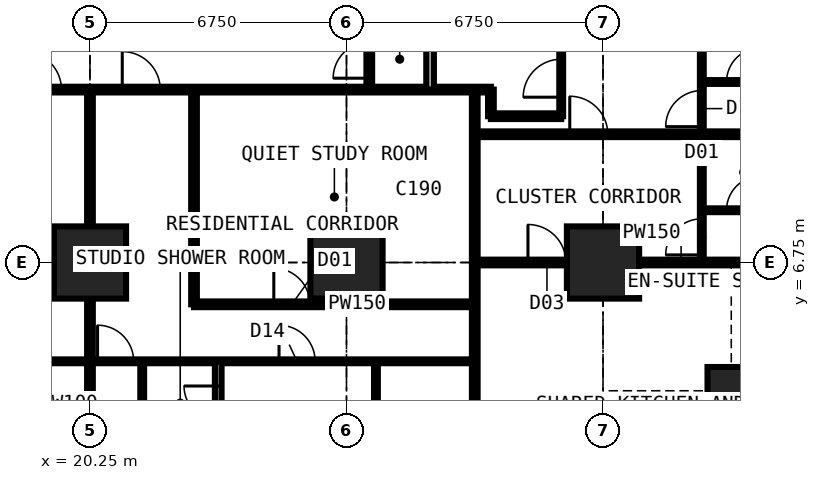
"""IFC4 building model, lengths in metres.
Left out: names, types, materials, properties, quantities, classifications, styles, units other than length and angle.
Written with IfcOpenShell. Run it as: python <this file> out.ifc"""

import sys

from ifc_helpers import new_model, si_unit, direction, frame, frame_2d, origin, origin_2d, place, context, subcontext, project, spatial, rectangle, extrude, element, fill, save


model = new_model("IFC4")
c1 = context("Model", 3, precision=1e-05, world=origin(), true_north=direction((0.0, 1.0)))
c2 = subcontext(c1, "Body", "Model", "MODEL_VIEW")
j1 = project(units=[si_unit("LENGTHUNIT", "METRE"), si_unit("PLANEANGLEUNIT", "RADIAN")], contexts=[c1])
p1 = place(None, origin())
s1 = spatial("IfcSite", under=j1, at=p1, CompositionType="ELEMENT")
p2 = place(p1, origin())
s2 = spatial("IfcBuilding", under=s1, at=p2, CompositionType="ELEMENT")
p3 = place(p2, frame((0.0, 0.0, 32.4)))
s3 = spatial("IfcBuildingStorey", under=s2, at=p3, CompositionType="ELEMENT", Elevation=32.4)
for number, where, z_axis, x_axis in (
    (1, (20.25, 6.75, 0.0), (0.0, 0.0, 1.0), (1.0, 0.0, 0.0)),
    (2, (27.0, 6.75, 0.0), (0.0, 0.0, 1.0), (1.0, 0.0, 0.0)),
    (3, (33.75, 6.75, 0.0), (0.0, 0.0, 1.0), (1.0, 0.0, 0.0)),
):
    element("IfcColumn", number, at=place(p3, frame(where, z_axis=z_axis, x_axis=x_axis)), inside=s3, PredefinedType="COLUMN", context=c2, shape_type="SweptSolid", body=[
        extrude(rectangle(XDim=1.9, YDim=1.9, at=origin_2d()), origin(), (0.0, 0.0, 1.0), 3.6),
    ])
p4 = place(p3, frame((37.125, 3.375, 0.0), z_axis=(0.0, 0.0, 1.0), x_axis=(1.0, 0.0, 0.0)))
e4 = element("IfcColumn", 4, at=p4, inside=s3, PredefinedType="COLUMN", context=c2, shape_type="SweptSolid", body=[
    extrude(rectangle(XDim=1.25, YDim=1.25, at=origin_2d()), origin(), (0.0, 0.0, 1.0), 3.6),
])
p5 = place(p3, frame((6.75, 4.15, 0.0), z_axis=(0.0, 0.0, 1.0), x_axis=(1.0, 0.0, 0.0)))
e5 = element("IfcWall", 5, at=p5, inside=s3, PredefinedType="PARTITIONING", context=c2, shape_type="SweptSolid", body=[
    extrude(rectangle(XDim=23.625, YDim=0.1, at=frame_2d((11.812, 0.0))), origin(), (0.0, 0.0, 1.0), 3.375),
])
p6 = place(p5, frame((2.85, 0.0, 0.0)))
e6 = element("IfcOpeningElement", 6, at=p6, cuts=e5, PredefinedType="OPENING", context=c2, shape_type="SweptSolid", body=[
    extrude(rectangle(XDim=1.0, YDim=2.2, at=frame_2d((0.5, 1.1))), frame((0.0, 0.06, 0.0), z_axis=(0.0, -1.0, 0.0), x_axis=(1.0, 0.0, 0.0)), (0.0, 0.0, 1.0), 0.12),
])
p7 = place(p5, frame((6.95, 0.0, 0.0)))
e7 = element("IfcOpeningElement", 7, at=p7, cuts=e5, PredefinedType="OPENING", context=c2, shape_type="SweptSolid", body=[
    extrude(rectangle(XDim=0.95, YDim=2.2, at=frame_2d((0.475, 1.1))), frame((0.0, 0.06, 0.0), z_axis=(0.0, -1.0, 0.0), x_axis=(1.0, 0.0, 0.0)), (0.0, 0.0, 1.0), 0.12),
])
p8 = place(p5, frame((10.375, 0.0, 0.0)))
e8 = element("IfcOpeningElement", 8, at=p8, cuts=e5, PredefinedType="OPENING", context=c2, shape_type="SweptSolid", body=[
    extrude(rectangle(XDim=0.95, YDim=2.2, at=frame_2d((0.475, 1.1))), frame((0.0, 0.06, 0.0), z_axis=(0.0, -1.0, 0.0), x_axis=(1.0, 0.0, 0.0)), (0.0, 0.0, 1.0), 0.12),
])
p9 = place(p5, frame((18.475, 0.0, 0.0)))
e9 = element("IfcOpeningElement", 9, at=p9, cuts=e5, PredefinedType="OPENING", context=c2, shape_type="SweptSolid", body=[
    extrude(rectangle(XDim=0.95, YDim=2.2, at=frame_2d((0.475, 1.1))), frame((0.0, 0.06, 0.0), z_axis=(0.0, -1.0, 0.0), x_axis=(1.0, 0.0, 0.0)), (0.0, 0.0, 1.0), 0.12),
])
p10 = place(p5, frame((13.7, 0.0, 0.0)))
e10 = element("IfcOpeningElement", 10, at=p10, cuts=e5, PredefinedType="OPENING", context=c2, shape_type="SweptSolid", body=[
    extrude(rectangle(XDim=0.95, YDim=2.2, at=frame_2d((0.475, 1.1))), frame((0.0, 0.06, 0.0), z_axis=(0.0, -1.0, 0.0), x_axis=(1.0, 0.0, 0.0)), (0.0, 0.0, 1.0), 0.12),
])
p11 = place(p3, frame((10.125, 11.3, 0.0), z_axis=(0.0, 0.0, 1.0), x_axis=(1.0, 0.0, 0.0)))
e11 = element("IfcWall", 11, at=p11, inside=s3, PredefinedType="PARTITIONING", context=c2, shape_type="SweptSolid", body=[
    extrude(rectangle(XDim=20.675, YDim=0.15, at=frame_2d((10.337, 0.0))), origin(), (0.0, 0.0, 1.0), 3.375),
])
p12 = place(p11, frame((8.375, 0.0, 0.0)))
e12 = element("IfcOpeningElement", 12, at=p12, cuts=e11, PredefinedType="OPENING", context=c2, shape_type="SweptSolid", body=[
    extrude(rectangle(XDim=1.0, YDim=2.2, at=frame_2d((0.5, 1.1))), frame((0.0, 0.085, 0.0), z_axis=(0.0, -1.0, 0.0), x_axis=(1.0, 0.0, 0.0)), (0.0, 0.0, 1.0), 0.17),
])
p13 = place(p11, frame((10.975, 0.0, 0.0)))
e13 = element("IfcOpeningElement", 13, at=p13, cuts=e11, PredefinedType="OPENING", context=c2, shape_type="SweptSolid", body=[
    extrude(rectangle(XDim=1.0, YDim=2.2, at=frame_2d((0.5, 1.1))), frame((0.0, 0.085, 0.0), z_axis=(0.0, -1.0, 0.0), x_axis=(1.0, 0.0, 0.0)), (0.0, 0.0, 1.0), 0.17),
])
p14 = place(p11, frame((3.925, 0.0, 0.0)))
e14 = element("IfcOpeningElement", 14, at=p14, cuts=e11, PredefinedType="OPENING", context=c2, shape_type="SweptSolid", body=[
    extrude(rectangle(XDim=0.95, YDim=2.2, at=frame_2d((0.475, 1.1))), frame((0.0, 0.085, 0.0), z_axis=(0.0, -1.0, 0.0), x_axis=(1.0, 0.0, 0.0)), (0.0, 0.0, 1.0), 0.17),
])
p15 = place(p3, frame((20.25, -0.734, 0.0), z_axis=(0.0, 0.0, 1.0), x_axis=(0.0, 1.0, 0.0)))
e15 = element("IfcWall", 15, at=p15, inside=s3, PredefinedType="PARTITIONING", context=c2, shape_type="SweptSolid", body=[
    extrude(rectangle(XDim=12.034, YDim=0.15, at=frame_2d((6.017, 0.0))), origin(), (0.0, 0.0, 1.0), 2.61),
])
p16 = place(p3, frame((21.625, 1.95, 0.0), z_axis=(0.0, 0.0, 1.0), x_axis=(0.0, 1.0, 0.0)))
e16 = element("IfcWall", 16, at=p16, inside=s3, PredefinedType="PARTITIONING", context=c2, shape_type="SweptSolid", body=[
    extrude(rectangle(XDim=2.2, YDim=0.1, at=frame_2d((1.1, 0.0))), origin(), (0.0, 0.0, 1.0), 3.375),
])
p17 = place(p3, frame((22.988, 5.65, 0.0), z_axis=(0.0, 0.0, 1.0), x_axis=(1.0, 0.0, 0.0)))
e17 = element("IfcWall", 17, at=p17, inside=s3, PredefinedType="PARTITIONING", context=c2, shape_type="SweptSolid", body=[
    extrude(rectangle(XDim=7.387, YDim=0.15, at=frame_2d((3.694, 0.0))), origin(), (0.0, 0.0, 1.0), 3.375),
])
p18 = place(p17, frame((2.1, 0.0, 0.0)))
e18 = element("IfcOpeningElement", 18, at=p18, cuts=e17, PredefinedType="OPENING", context=c2, shape_type="SweptSolid", body=[
    extrude(rectangle(XDim=0.95, YDim=2.2, at=frame_2d((0.475, 1.1))), frame((0.0, 0.085, 0.0), z_axis=(0.0, -1.0, 0.0), x_axis=(1.0, 0.0, 0.0)), (0.0, 0.0, 1.0), 0.17),
])
p19 = place(p3, frame((22.988, 5.65, 0.0), z_axis=(0.0, 0.0, 1.0), x_axis=(0.0, 1.0, 0.0)))
e19 = element("IfcWall", 19, at=p19, inside=s3, PredefinedType="PARTITIONING", context=c2, shape_type="SweptSolid", body=[
    extrude(rectangle(XDim=5.65, YDim=0.15, at=frame_2d((2.825, 0.0))), origin(), (0.0, 0.0, 1.0), 3.375),
])
p20 = place(p3, frame((23.625, -0.734, 0.0), z_axis=(0.0, 0.0, 1.0), x_axis=(0.0, 1.0, 0.0)))
e20 = element("IfcWall", 20, at=p20, inside=s3, PredefinedType="PARTITIONING", context=c2, shape_type="SweptSolid", body=[
    extrude(rectangle(XDim=4.884, YDim=0.175, at=frame_2d((2.442, 0.0))), origin(), (0.0, 0.0, 1.0), 3.375),
])
p21 = place(p20, frame((3.334, 0.0, 0.0)))
e21 = element("IfcOpeningElement", 21, at=p21, cuts=e20, PredefinedType="OPENING", context=c2, shape_type="SweptSolid", body=[
    extrude(rectangle(XDim=0.9, YDim=2.2, at=frame_2d((0.45, 1.1))), frame((0.0, 0.097, 0.0), z_axis=(0.0, -1.0, 0.0), x_axis=(1.0, 0.0, 0.0)), (0.0, 0.0, 1.0), 0.195),
])
p22 = place(p3, frame((27.6, 11.3, 0.0), z_axis=(0.0, 0.0, 1.0), x_axis=(0.0, 1.0, 0.0)))
e22 = element("IfcWall", 22, at=p22, inside=s3, PredefinedType="PARTITIONING", context=c2, shape_type="SweptSolid", body=[
    extrude(rectangle(XDim=1.6, YDim=0.15, at=frame_2d((0.8, 0.0))), origin(), (0.0, 0.0, 1.0), 3.375),
])
p23 = place(p22, frame((0.3, 0.0, 0.0)))
e23 = element("IfcOpeningElement", 23, at=p23, cuts=e22, PredefinedType="OPENING", context=c2, shape_type="SweptSolid", body=[
    extrude(rectangle(XDim=0.95, YDim=2.2, at=frame_2d((0.475, 1.1))), frame((0.0, 0.085, 0.0), z_axis=(0.0, -1.0, 0.0), x_axis=(1.0, 0.0, 0.0)), (0.0, 0.0, 1.0), 0.17),
])
p24 = place(p3, frame((27.775, 1.75, 0.0), z_axis=(0.0, 0.0, 1.0), x_axis=(0.0, 1.0, 0.0)))
e24 = element("IfcWall", 24, at=p24, inside=s3, PredefinedType="PARTITIONING", context=c2, shape_type="SweptSolid", body=[
    extrude(rectangle(XDim=2.4, YDim=0.1, at=frame_2d((1.2, 0.0))), origin(), (0.0, 0.0, 1.0), 3.375),
])
p25 = place(p3, frame((29.2, 11.3, 0.0), z_axis=(0.0, 0.0, 1.0), x_axis=(0.0, 1.0, 0.0)))
e25 = element("IfcWall", 25, at=p25, inside=s3, PredefinedType="PARTITIONING", context=c2, shape_type="SweptSolid", body=[
    extrude(rectangle(XDim=17.9, YDim=0.2, at=frame_2d((8.95, 0.0))), origin(), (0.0, 0.0, 1.0), 3.375),
])
p26 = place(p25, frame((8.35, 0.0, 0.0)))
e26 = element("IfcOpeningElement", 26, at=p26, cuts=e25, PredefinedType="OPENING", context=c2, shape_type="SweptSolid", body=[
    extrude(rectangle(XDim=1.2, YDim=2.2, at=frame_2d((0.6, 1.1))), frame((0.0, 0.11, 0.0), z_axis=(0.0, -1.0, 0.0), x_axis=(1.0, 0.0, 0.0)), (0.0, 0.0, 1.0), 0.22),
])
p27 = place(p3, frame((30.375, -0.734, 0.0), z_axis=(0.0, 0.0, 1.0), x_axis=(0.0, 1.0, 0.0)))
e27 = element("IfcWall", 27, at=p27, inside=s3, PredefinedType="PARTITIONING", context=c2, shape_type="SweptSolid", body=[
    extrude(rectangle(XDim=12.034, YDim=0.15, at=frame_2d((6.017, 0.0))), origin(), (0.0, 0.0, 1.0), 3.375),
])
p28 = place(p3, frame((30.375, 6.75, 0.0), z_axis=(0.0, 0.0, 1.0), x_axis=(1.0, 0.0, 0.0)))
e28 = element("IfcWall", 28, at=p28, inside=s3, PredefinedType="PARTITIONING", context=c2, shape_type="SweptSolid", body=[
    extrude(rectangle(XDim=10.859, YDim=0.15, at=frame_2d((5.429, 0.0))), origin(), (0.0, 0.0, 1.0), 2.877),
])
p29 = place(p28, frame((1.4, 0.0, 0.0)))
e29 = element("IfcOpeningElement", 29, at=p29, cuts=e28, PredefinedType="OPENING", context=c2, shape_type="SweptSolid", body=[
    extrude(rectangle(XDim=1.0, YDim=2.2, at=frame_2d((0.5, 1.1))), frame((0.0, 0.085, 0.0), z_axis=(0.0, -1.0, 0.0), x_axis=(1.0, 0.0, 0.0)), (0.0, 0.0, 1.0), 0.17),
])
p30 = place(p3, frame((30.375, 10.125, 0.0), z_axis=(0.0, 0.0, 1.0), x_axis=(1.0, 0.0, 0.0)))
e30 = element("IfcWall", 30, at=p30, inside=s3, PredefinedType="PARTITIONING", context=c2, shape_type="SweptSolid", body=[
    extrude(rectangle(XDim=10.859, YDim=0.15, at=frame_2d((5.429, 0.0))), origin(), (0.0, 0.0, 1.0), 3.375),
])
p31 = place(p30, frame((2.5, 0.0, 0.0)))
e31 = element("IfcOpeningElement", 31, at=p31, cuts=e30, PredefinedType="OPENING", context=c2, shape_type="SweptSolid", body=[
    extrude(rectangle(XDim=1.0, YDim=2.2, at=frame_2d((0.5, 1.1))), frame((0.0, 0.085, 0.0), z_axis=(0.0, -1.0, 0.0), x_axis=(1.0, 0.0, 0.0)), (0.0, 0.0, 1.0), 0.17),
])
p32 = place(p3, frame((30.8, 10.6, 0.0), z_axis=(0.0, 0.0, 1.0), x_axis=(0.0, 1.0, 0.0)))
e32 = element("IfcWall", 32, at=p32, inside=s3, PredefinedType="PARTITIONING", context=c2, shape_type="SweptSolid", body=[
    extrude(rectangle(XDim=0.7, YDim=0.15, at=frame_2d((0.35, 0.0))), origin(), (0.0, 0.0, 1.0), 3.375),
])
p33 = place(p3, frame((30.8, 10.6, 0.0), z_axis=(0.0, 0.0, 1.0), x_axis=(1.0, 0.0, 0.0)))
e33 = element("IfcWall", 33, at=p33, inside=s3, PredefinedType="PARTITIONING", context=c2, shape_type="SweptSolid", body=[
    extrude(rectangle(XDim=1.85, YDim=0.15, at=frame_2d((0.925, 0.0))), origin(), (0.0, 0.0, 1.0), 3.375),
])
p34 = place(p3, frame((32.65, 10.6, 0.0), z_axis=(0.0, 0.0, 1.0), x_axis=(0.0, 1.0, 0.0)))
e34 = element("IfcWall", 34, at=p34, inside=s3, PredefinedType="SHEAR", context=c2, shape_type="SweptSolid", body=[
    extrude(rectangle(XDim=9.3, YDim=0.1, at=frame_2d((4.65, 0.0))), origin(), (0.0, 0.0, 1.0), 3.375),
])
p35 = place(p34, frame((0.5, 0.0, 0.0)))
e35 = element("IfcOpeningElement", 35, at=p35, cuts=e34, PredefinedType="OPENING", context=c2, shape_type="SweptSolid", body=[
    extrude(rectangle(XDim=1.0, YDim=2.2, at=frame_2d((0.5, 1.1))), frame((0.0, 0.06, 0.0), z_axis=(0.0, -1.0, 0.0), x_axis=(1.0, 0.0, 0.0)), (0.0, 0.0, 1.0), 0.12),
])
p36 = place(p3, frame((36.35, 6.75, 0.0), z_axis=(0.0, 0.0, 1.0), x_axis=(0.0, 1.0, 0.0)))
e36 = element("IfcWall", 36, at=p36, inside=s3, PredefinedType="PARTITIONING", context=c2, shape_type="SweptSolid", body=[
    extrude(rectangle(XDim=23.625, YDim=0.1, at=frame_2d((11.812, 0.0))), origin(), (0.0, 0.0, 1.0), 3.375),
])
p37 = place(p36, frame((0.2, 0.0, 0.0)))
e37 = element("IfcOpeningElement", 37, at=p37, cuts=e36, PredefinedType="OPENING", context=c2, shape_type="SweptSolid", body=[
    extrude(rectangle(XDim=0.95, YDim=2.2, at=frame_2d((0.475, 1.1))), frame((0.0, 0.06, 0.0), z_axis=(0.0, -1.0, 0.0), x_axis=(1.0, 0.0, 0.0)), (0.0, 0.0, 1.0), 0.12),
])
p38 = place(p36, frame((3.575, 0.0, 0.0)))
e38 = element("IfcOpeningElement", 38, at=p38, cuts=e36, PredefinedType="OPENING", context=c2, shape_type="SweptSolid", body=[
    extrude(rectangle(XDim=0.95, YDim=2.2, at=frame_2d((0.475, 1.1))), frame((0.0, 0.06, 0.0), z_axis=(0.0, -1.0, 0.0), x_axis=(1.0, 0.0, 0.0)), (0.0, 0.0, 1.0), 0.12),
])
p39 = place(p36, frame((7.0, 0.0, 0.0)))
e39 = element("IfcOpeningElement", 39, at=p39, cuts=e36, PredefinedType="OPENING", context=c2, shape_type="SweptSolid", body=[
    extrude(rectangle(XDim=0.95, YDim=2.2, at=frame_2d((0.475, 1.1))), frame((0.0, 0.06, 0.0), z_axis=(0.0, -1.0, 0.0), x_axis=(1.0, 0.0, 0.0)), (0.0, 0.0, 1.0), 0.12),
])
p40 = place(p36, frame((10.375, 0.0, 0.0)))
e40 = element("IfcOpeningElement", 40, at=p40, cuts=e36, PredefinedType="OPENING", context=c2, shape_type="SweptSolid", body=[
    extrude(rectangle(XDim=0.95, YDim=2.2, at=frame_2d((0.475, 1.1))), frame((0.0, 0.06, 0.0), z_axis=(0.0, -1.0, 0.0), x_axis=(1.0, 0.0, 0.0)), (0.0, 0.0, 1.0), 0.12),
])
p41 = place(p36, frame((13.75, 0.0, 0.0)))
e41 = element("IfcOpeningElement", 41, at=p41, cuts=e36, PredefinedType="OPENING", context=c2, shape_type="SweptSolid", body=[
    extrude(rectangle(XDim=0.95, YDim=2.2, at=frame_2d((0.475, 1.1))), frame((0.0, 0.06, 0.0), z_axis=(0.0, -1.0, 0.0), x_axis=(1.0, 0.0, 0.0)), (0.0, 0.0, 1.0), 0.12),
])
p42 = place(p36, frame((17.125, 0.0, 0.0)))
e42 = element("IfcOpeningElement", 42, at=p42, cuts=e36, PredefinedType="OPENING", context=c2, shape_type="SweptSolid", body=[
    extrude(rectangle(XDim=0.95, YDim=2.2, at=frame_2d((0.475, 1.1))), frame((0.0, 0.06, 0.0), z_axis=(0.0, -1.0, 0.0), x_axis=(1.0, 0.0, 0.0)), (0.0, 0.0, 1.0), 0.12),
])
p43 = place(p36, frame((20.5, 0.0, 0.0)))
e43 = element("IfcOpeningElement", 43, at=p43, cuts=e36, PredefinedType="OPENING", context=c2, shape_type="SweptSolid", body=[
    extrude(rectangle(XDim=0.95, YDim=2.2, at=frame_2d((0.475, 1.1))), frame((0.0, 0.06, 0.0), z_axis=(0.0, -1.0, 0.0), x_axis=(1.0, 0.0, 0.0)), (0.0, 0.0, 1.0), 0.12),
])
p44 = place(p3, frame((36.35, 8.125, 0.0), z_axis=(0.0, 0.0, 1.0), x_axis=(1.0, 0.0, 0.0)))
e44 = element("IfcWall", 44, at=p44, inside=s3, PredefinedType="PARTITIONING", context=c2, shape_type="SweptSolid", body=[
    extrude(rectangle(XDim=2.2, YDim=0.1, at=frame_2d((1.1, 0.0))), origin(), (0.0, 0.0, 1.0), 3.375),
])
p45 = place(p44, frame((0.65, 0.0, 0.0)))
e45 = element("IfcOpeningElement", 45, at=p45, cuts=e44, PredefinedType="OPENING", context=c2, shape_type="SweptSolid", body=[
    extrude(rectangle(XDim=0.9, YDim=2.2, at=frame_2d((0.45, 1.1))), frame((0.0, 0.06, 0.0), z_axis=(0.0, -1.0, 0.0), x_axis=(1.0, 0.0, 0.0)), (0.0, 0.0, 1.0), 0.12),
])
p46 = place(p3, frame((36.35, 11.5, 0.0), z_axis=(0.0, 0.0, 1.0), x_axis=(1.0, 0.0, 0.0)))
e46 = element("IfcWall", 46, at=p46, inside=s3, PredefinedType="PARTITIONING", context=c2, shape_type="SweptSolid", body=[
    extrude(rectangle(XDim=2.2, YDim=0.1, at=frame_2d((1.1, 0.0))), origin(), (0.0, 0.0, 1.0), 3.375),
])
p47 = place(p46, frame((0.65, 0.0, 0.0)))
e47 = element("IfcOpeningElement", 47, at=p47, cuts=e46, PredefinedType="OPENING", context=c2, shape_type="SweptSolid", body=[
    extrude(rectangle(XDim=0.9, YDim=2.2, at=frame_2d((0.45, 1.1))), frame((0.0, 0.06, 0.0), z_axis=(0.0, -1.0, 0.0), x_axis=(1.0, 0.0, 0.0)), (0.0, 0.0, 1.0), 0.12),
])
p48 = place(p23, origin())
e48 = element("IfcDoor", 48, at=p48, inside=s3, OperationType="SINGLE_SWING_LEFT", PredefinedType="DOOR", context=c2, shape_type="SweptSolid", body=[
    extrude(rectangle(XDim=0.95, YDim=2.2, at=frame_2d((0.475, 1.1))), frame((0.0, 0.025, 0.0), z_axis=(0.0, -1.0, 0.0), x_axis=(1.0, 0.0, 0.0)), (0.0, 0.0, 1.0), 0.05),
])
fill(e23, e48)
p49 = place(p12, origin())
e49 = element("IfcDoor", 49, at=p49, inside=s3, OperationType="SINGLE_SWING_LEFT", PredefinedType="DOOR", context=c2, shape_type="SweptSolid", body=[
    extrude(rectangle(XDim=1.0, YDim=2.2, at=frame_2d((0.5, 1.1))), frame((0.0, 0.025, 0.0), z_axis=(0.0, -1.0, 0.0), x_axis=(1.0, 0.0, 0.0)), (0.0, 0.0, 1.0), 0.05),
])
fill(e12, e49)
p50 = place(p9, origin())
e50 = element("IfcDoor", 50, at=p50, inside=s3, OperationType="SINGLE_SWING_LEFT", PredefinedType="DOOR", context=c2, shape_type="SweptSolid", body=[
    extrude(rectangle(XDim=0.95, YDim=2.2, at=frame_2d((0.475, 1.1))), frame((0.0, 0.025, 0.0), z_axis=(0.0, -1.0, 0.0), x_axis=(1.0, 0.0, 0.0)), (0.0, 0.0, 1.0), 0.05),
])
fill(e9, e50)
p51 = place(p10, origin())
e51 = element("IfcDoor", 51, at=p51, inside=s3, OperationType="SINGLE_SWING_LEFT", PredefinedType="DOOR", context=c2, shape_type="SweptSolid", body=[
    extrude(rectangle(XDim=0.95, YDim=2.2, at=frame_2d((0.475, 1.1))), frame((0.0, 0.025, 0.0), z_axis=(0.0, -1.0, 0.0), x_axis=(1.0, 0.0, 0.0)), (0.0, 0.0, 1.0), 0.05),
])
fill(e10, e51)
p52 = place(p21, origin())
e52 = element("IfcDoor", 52, at=p52, inside=s3, OperationType="SINGLE_SWING_RIGHT", PredefinedType="DOOR", context=c2, shape_type="SweptSolid", body=[
    extrude(rectangle(XDim=0.9, YDim=2.2, at=frame_2d((0.45, 1.1))), frame((0.0, 0.025, 0.0), z_axis=(0.0, -1.0, 0.0), x_axis=(1.0, 0.0, 0.0)), (0.0, 0.0, 1.0), 0.05),
])
fill(e21, e52)
p53 = place(p13, origin())
e53 = element("IfcDoor", 53, at=p53, inside=s3, OperationType="SINGLE_SWING_LEFT", PredefinedType="DOOR", context=c2, shape_type="SweptSolid", body=[
    extrude(rectangle(XDim=1.0, YDim=2.2, at=frame_2d((0.5, 1.1))), frame((0.0, 0.025, 0.0), z_axis=(0.0, -1.0, 0.0), x_axis=(1.0, 0.0, 0.0)), (0.0, 0.0, 1.0), 0.05),
])
fill(e13, e53)
p54 = place(p18, origin())
e54 = element("IfcDoor", 54, at=p54, inside=s3, OperationType="SINGLE_SWING_LEFT", PredefinedType="DOOR", context=c2, shape_type="SweptSolid", body=[
    extrude(rectangle(XDim=0.95, YDim=2.2, at=frame_2d((0.475, 1.1))), frame((0.0, 0.025, 0.0), z_axis=(0.0, -1.0, 0.0), x_axis=(1.0, 0.0, 0.0)), (0.0, 0.0, 1.0), 0.05),
])
fill(e18, e54)
p55 = place(p29, origin())
e55 = element("IfcDoor", 55, at=p55, inside=s3, OperationType="SINGLE_SWING_LEFT", PredefinedType="DOOR", context=c2, shape_type="SweptSolid", body=[
    extrude(rectangle(XDim=1.0, YDim=2.2, at=frame_2d((0.5, 1.1))), frame((0.0, 0.025, 0.0), z_axis=(0.0, -1.0, 0.0), x_axis=(1.0, 0.0, 0.0)), (0.0, 0.0, 1.0), 0.05),
])
fill(e29, e55)
p56 = place(p37, origin())
e56 = element("IfcDoor", 56, at=p56, inside=s3, OperationType="SINGLE_SWING_LEFT", PredefinedType="DOOR", context=c2, shape_type="SweptSolid", body=[
    extrude(rectangle(XDim=0.95, YDim=2.2, at=frame_2d((0.475, 1.1))), frame((0.0, 0.025, 0.0), z_axis=(0.0, -1.0, 0.0), x_axis=(1.0, 0.0, 0.0)), (0.0, 0.0, 1.0), 0.05),
])
fill(e37, e56)
p57 = place(p45, origin())
e57 = element("IfcDoor", 57, at=p57, inside=s3, OperationType="SINGLE_SWING_RIGHT", PredefinedType="DOOR", context=c2, shape_type="SweptSolid", body=[
    extrude(rectangle(XDim=0.9, YDim=2.2, at=frame_2d((0.45, 1.1))), frame((0.0, 0.025, 0.0), z_axis=(0.0, -1.0, 0.0), x_axis=(1.0, 0.0, 0.0)), (0.0, 0.0, 1.0), 0.05),
])
fill(e45, e57)
p58 = place(p31, origin())
e58 = element("IfcDoor", 58, at=p58, inside=s3, OperationType="SINGLE_SWING_LEFT", PredefinedType="DOOR", context=c2, shape_type="SweptSolid", body=[
    extrude(rectangle(XDim=1.0, YDim=2.2, at=frame_2d((0.5, 1.1))), frame((0.0, 0.025, 0.0), z_axis=(0.0, -1.0, 0.0), x_axis=(1.0, 0.0, 0.0)), (0.0, 0.0, 1.0), 0.05),
])
fill(e31, e58)
p59 = place(p38, origin())
e59 = element("IfcDoor", 59, at=p59, inside=s3, OperationType="SINGLE_SWING_LEFT", PredefinedType="DOOR", context=c2, shape_type="SweptSolid", body=[
    extrude(rectangle(XDim=0.95, YDim=2.2, at=frame_2d((0.475, 1.1))), frame((0.0, 0.025, 0.0), z_axis=(0.0, -1.0, 0.0), x_axis=(1.0, 0.0, 0.0)), (0.0, 0.0, 1.0), 0.05),
])
fill(e38, e59)
p60 = place(p47, origin())
e60 = element("IfcDoor", 60, at=p60, inside=s3, OperationType="SINGLE_SWING_RIGHT", PredefinedType="DOOR", context=c2, shape_type="SweptSolid", body=[
    extrude(rectangle(XDim=0.9, YDim=2.2, at=frame_2d((0.45, 1.1))), frame((0.0, 0.025, 0.0), z_axis=(0.0, -1.0, 0.0), x_axis=(1.0, 0.0, 0.0)), (0.0, 0.0, 1.0), 0.05),
])
fill(e47, e60)
p61 = place(p35, origin())
e61 = element("IfcDoor", 61, at=p61, inside=s3, OperationType="SINGLE_SWING_LEFT", PredefinedType="DOOR", context=c2, shape_type="SweptSolid", body=[
    extrude(rectangle(XDim=1.0, YDim=2.2, at=frame_2d((0.5, 1.1))), frame((0.0, 0.025, 0.0), z_axis=(0.0, -1.0, 0.0), x_axis=(1.0, 0.0, 0.0)), (0.0, 0.0, 1.0), 0.05),
])
fill(e35, e61)
save(model, sys.argv[1])
